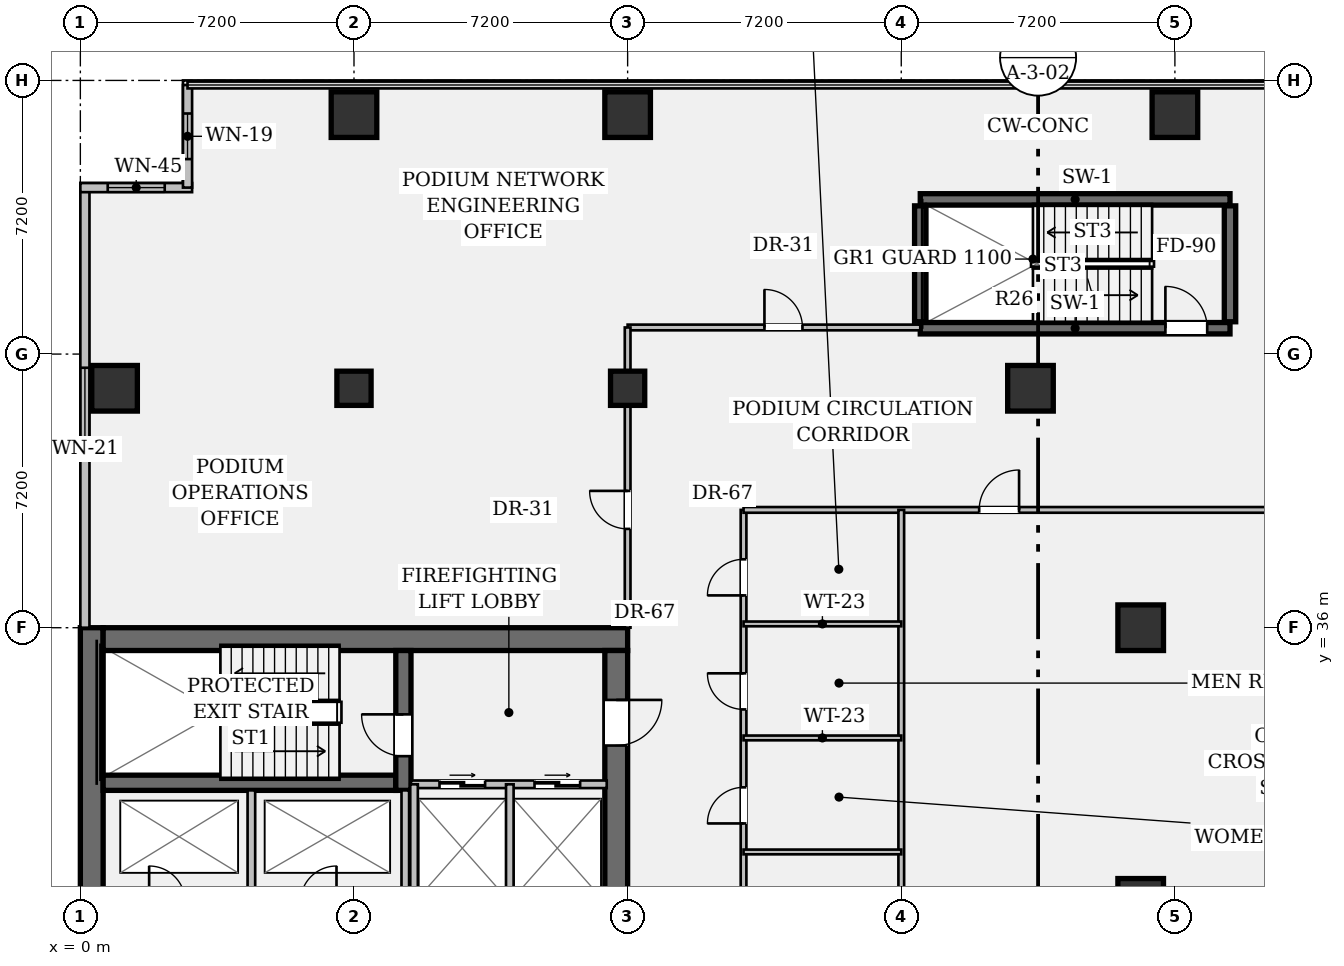
"""IFC4 building model, lengths in metres.
Left out: names, types, materials, properties, quantities, classifications, styles, units other than length and angle.
Written with IfcOpenShell. Run it as: python <this file> out.ifc"""

import sys

from ifc_helpers import new_model, si_unit, direction, frame, frame_2d, origin, origin_2d, place, context, subcontext, project, spatial, rectangle, hollow_rectangle, extrude, element, fill, save


model = new_model("IFC4")
c1 = context("Model", 3, precision=1e-05, world=origin(), true_north=direction((0.0, 1.0)))
c2 = subcontext(c1, "Body", "Model", "MODEL_VIEW")
j1 = project(units=[si_unit("LENGTHUNIT", "METRE"), si_unit("PLANEANGLEUNIT", "RADIAN")], contexts=[c1])
p1 = place(None, origin())
s1 = spatial("IfcSite", under=j1, at=p1, CompositionType="ELEMENT")
p2 = place(p1, origin())
s2 = spatial("IfcBuilding", under=s1, at=p2, CompositionType="ELEMENT")
p3 = place(p2, frame((0.0, 0.0, 9.45)))
s3 = spatial("IfcBuildingStorey", under=s2, at=p3, CompositionType="ELEMENT", Elevation=9.45)
p4 = place(p3, frame((0.3, 7.2, 0.0), z_axis=(0.0, 0.0, 1.0), x_axis=(0.0, 1.0, 0.0)))
e1 = element("IfcWall", 1, at=p4, inside=s3, PredefinedType="SHEAR", context=c2, shape_type="SweptSolid", body=[
    extrude(rectangle(XDim=28.8, YDim=0.6, at=frame_2d((14.4, 0.0))), origin(), (0.0, 0.0, 1.0), 3.9),
])
p5 = place(p3, frame((0.6, 35.7, 0.0), z_axis=(0.0, 0.0, 1.0), x_axis=(1.0, 0.0, 0.0)))
e2 = element("IfcWall", 2, at=p5, inside=s3, PredefinedType="SHEAR", context=c2, shape_type="SweptSolid", body=[
    extrude(rectangle(XDim=13.8, YDim=0.6, at=frame_2d((6.9, 0.0))), origin(), (0.0, 0.0, 1.0), 3.9),
])
p6 = place(p3, frame((14.1, 35.4, 0.0), z_axis=(0.0, 0.0, 1.0), x_axis=(0.0, -1.0, 0.0)))
e3 = element("IfcWall", 3, at=p6, inside=s3, PredefinedType="SHEAR", context=c2, shape_type="SweptSolid", body=[
    extrude(rectangle(XDim=27.6, YDim=0.6, at=frame_2d((13.8, 0.0))), origin(), (0.0, 0.0, 1.0), 3.9),
])
p7 = place(p6, frame((1.3, 0.0, 0.0)))
e4 = element("IfcOpeningElement", 4, at=p7, cuts=e3, PredefinedType="OPENING", context=c2, shape_type="SweptSolid", body=[
    extrude(rectangle(XDim=1.2, YDim=2.15, at=frame_2d((0.6, 1.075))), frame((0.0, 0.312, 0.0), z_axis=(0.0, -1.0, 0.0), x_axis=(1.0, 0.0, 0.0)), (0.0, 0.0, 1.0), 0.624),
])
p8 = place(p6, frame((25.25, 0.0, 0.0)))
e5 = element("IfcOpeningElement", 5, at=p8, cuts=e3, PredefinedType="OPENING", context=c2, shape_type="SweptSolid", body=[
    extrude(rectangle(XDim=1.2, YDim=2.15, at=frame_2d((0.6, 1.075))), frame((0.0, 0.312, 0.0), z_axis=(0.0, -1.0, 0.0), x_axis=(1.0, 0.0, 0.0)), (0.0, 0.0, 1.0), 0.624),
])
p9 = place(p6, frame((14.6, 0.0, 0.0)))
e6 = element("IfcOpeningElement", 6, at=p9, cuts=e3, PredefinedType="OPENING", context=c2, shape_type="SweptSolid", body=[
    extrude(rectangle(XDim=1.6, YDim=2.2, at=frame_2d((0.8, 1.1))), frame((0.0, 0.312, 0.0), z_axis=(0.0, -1.0, 0.0), x_axis=(1.0, 0.0, 0.0)), (0.0, 0.0, 1.0), 0.624),
])
p10 = place(p3, frame((0.6, 31.92, 0.0), z_axis=(0.0, 0.0, 1.0), x_axis=(1.0, 0.0, 0.0)))
e7 = element("IfcWall", 7, at=p10, inside=s3, PredefinedType="SHEAR", context=c2, shape_type="SweptSolid", body=[
    extrude(rectangle(XDim=7.7, YDim=0.4, at=frame_2d((3.85, 0.0))), origin(), (0.0, 0.0, 1.0), 3.9),
])
p11 = place(p3, frame((8.5, 31.72, 0.0), z_axis=(0.0, 0.0, 1.0), x_axis=(0.0, 1.0, 0.0)))
e8 = element("IfcWall", 8, at=p11, inside=s3, PredefinedType="SHEAR", context=c2, shape_type="SweptSolid", body=[
    extrude(rectangle(XDim=3.68, YDim=0.4, at=frame_2d((1.84, 0.0))), origin(), (0.0, 0.0, 1.0), 3.9),
])
p12 = place(p11, frame((0.9, 0.0, 0.0)))
e9 = element("IfcOpeningElement", 9, at=p12, cuts=e8, PredefinedType="OPENING", context=c2, shape_type="SweptSolid", body=[
    extrude(rectangle(XDim=1.1, YDim=2.15, at=frame_2d((0.55, 1.075))), frame((0.0, 0.212, 0.0), z_axis=(0.0, -1.0, 0.0), x_axis=(1.0, 0.0, 0.0)), (0.0, 0.0, 1.0), 0.424),
])
p13 = place(p3, frame((22.1, 43.88, 0.0), z_axis=(0.0, 0.0, 1.0), x_axis=(1.0, 0.0, 0.0)))
e10 = element("IfcWall", 10, at=p13, inside=s3, PredefinedType="SHEAR", context=c2, shape_type="SweptSolid", body=[
    extrude(rectangle(XDim=8.15, YDim=0.3, at=frame_2d((4.075, 0.0))), origin(), (0.0, 0.0, 1.0), 3.9),
])
p14 = place(p13, frame((6.45, 0.0, 0.0)))
e11 = element("IfcOpeningElement", 11, at=p14, cuts=e10, PredefinedType="OPENING", context=c2, shape_type="SweptSolid", body=[
    extrude(rectangle(XDim=1.1, YDim=2.15, at=frame_2d((0.55, 1.075))), frame((0.0, 0.162, 0.0), z_axis=(0.0, -1.0, 0.0), x_axis=(1.0, 0.0, 0.0)), (0.0, 0.0, 1.0), 0.324),
])
p15 = place(p3, frame((22.1, 47.27, 0.0), z_axis=(0.0, 0.0, 1.0), x_axis=(1.0, 0.0, 0.0)))
e12 = element("IfcWall", 12, at=p15, inside=s3, PredefinedType="SHEAR", context=c2, shape_type="SweptSolid", body=[
    extrude(rectangle(XDim=8.15, YDim=0.3, at=frame_2d((4.075, 0.0))), origin(), (0.0, 0.0, 1.0), 3.9),
])
for number, where, z_axis, x_axis in (
    (13, (22.1, 44.05, 0.0), (0.0, 0.0, 1.0), (0.0, 1.0, 0.0)),
    (14, (30.25, 44.05, 0.0), (0.0, 0.0, 1.0), (0.0, 1.0, 0.0)),
):
    element("IfcWall", number, at=place(p3, frame(where, z_axis=z_axis, x_axis=x_axis)), inside=s3, PredefinedType="SHEAR", context=c2, shape_type="SweptSolid", body=[
        extrude(rectangle(XDim=3.05, YDim=0.3, at=frame_2d((1.525, 0.0))), origin(), (0.0, 0.0, 1.0), 3.9),
    ])
p16 = place(p3, frame((0.9, 42.3, 0.0), z_axis=(0.0, 0.0, 1.0), x_axis=(1.0, 0.0, 0.0)))
e15 = element("IfcColumn", 15, at=p16, inside=s3, PredefinedType="COLUMN", context=c2, shape_type="SweptSolid", body=[
    extrude(hollow_rectangle(XDim=1.2, YDim=1.2, WallThickness=0.075, at=origin_2d()), origin(), (0.0, 0.0, 1.0), 3.9),
])
p17 = place(p3, frame((7.2, 42.3, 0.0), z_axis=(0.0, 0.0, 1.0), x_axis=(1.0, 0.0, 0.0)))
e16 = element("IfcColumn", 16, at=p17, inside=s3, PredefinedType="COLUMN", context=c2, shape_type="SweptSolid", body=[
    extrude(rectangle(XDim=0.9, YDim=0.9, at=origin_2d()), origin(), (0.0, 0.0, 1.0), 3.9),
])
p18 = place(p3, frame((7.2, 49.5, 0.0), z_axis=(0.0, 0.0, 1.0), x_axis=(1.0, 0.0, 0.0)))
e17 = element("IfcColumn", 17, at=p18, inside=s3, PredefinedType="COLUMN", context=c2, shape_type="SweptSolid", body=[
    extrude(hollow_rectangle(XDim=1.2, YDim=1.2, WallThickness=0.075, at=origin_2d()), origin(), (0.0, 0.0, 1.0), 3.9),
])
p19 = place(p3, frame((14.4, 42.3, 0.0), z_axis=(0.0, 0.0, 1.0), x_axis=(1.0, 0.0, 0.0)))
e18 = element("IfcColumn", 18, at=p19, inside=s3, PredefinedType="COLUMN", context=c2, shape_type="SweptSolid", body=[
    extrude(rectangle(XDim=0.9, YDim=0.9, at=origin_2d()), origin(), (0.0, 0.0, 1.0), 3.9),
])
for number, where, z_axis, x_axis in (
    (19, (14.4, 49.5, 0.0), (0.0, 0.0, 1.0), (1.0, 0.0, 0.0)),
    (20, (25.0, 42.3, 0.0), (0.0, 0.0, 1.0), (1.0, 0.0, 0.0)),
    (21, (27.9, 28.8, 0.0), (0.0, 0.0, 1.0), (1.0, 0.0, 0.0)),
    (22, (27.9, 36.0, 0.0), (0.0, 0.0, 1.0), (1.0, 0.0, 0.0)),
    (23, (28.8, 49.5, 0.0), (0.0, 0.0, 1.0), (1.0, 0.0, 0.0)),
):
    element("IfcColumn", number, at=place(p3, frame(where, z_axis=z_axis, x_axis=x_axis)), inside=s3, PredefinedType="COLUMN", context=c2, shape_type="SweptSolid", body=[
        extrude(hollow_rectangle(XDim=1.2, YDim=1.2, WallThickness=0.075, at=origin_2d()), origin(), (0.0, 0.0, 1.0), 3.9),
    ])
p20 = place(p3, frame((0.12, 36.0, 0.0), z_axis=(0.0, 0.0, 1.0), x_axis=(0.0, 1.0, 0.0)))
e24 = element("IfcWall", 24, at=p20, inside=s3, PredefinedType="STANDARD", context=c2, shape_type="SweptSolid", body=[
    extrude(rectangle(XDim=11.58, YDim=0.24, at=frame_2d((5.79, 0.0))), origin(), (0.0, 0.0, 1.0), 3.9),
])
p21 = place(p20, frame((4.74, 0.0, 0.95)))
e25 = element("IfcOpeningElement", 25, at=p21, cuts=e24, PredefinedType="OPENING", context=c2, shape_type="SweptSolid", body=[
    extrude(rectangle(XDim=2.1, YDim=1.8, at=frame_2d((1.05, 0.9))), frame((0.0, 0.132, 0.0), z_axis=(0.0, -1.0, 0.0), x_axis=(1.0, 0.0, 0.0)), (0.0, 0.0, 1.0), 0.264),
])
p22 = place(p3, frame((0.0, 47.58, 0.0), z_axis=(0.0, 0.0, 1.0), x_axis=(1.0, 0.0, 0.0)))
e26 = element("IfcWall", 26, at=p22, inside=s3, PredefinedType="STANDARD", context=c2, shape_type="SweptSolid", body=[
    extrude(rectangle(XDim=2.94, YDim=0.24, at=frame_2d((1.47, 0.0))), origin(), (0.0, 0.0, 1.0), 3.9),
])
p23 = place(p22, frame((0.72, 0.0, 0.95)))
e27 = element("IfcOpeningElement", 27, at=p23, cuts=e26, PredefinedType="OPENING", context=c2, shape_type="SweptSolid", body=[
    extrude(rectangle(XDim=1.5, YDim=1.8, at=frame_2d((0.75, 0.9))), frame((0.0, 0.132, 0.0), z_axis=(0.0, -1.0, 0.0), x_axis=(1.0, 0.0, 0.0)), (0.0, 0.0, 1.0), 0.264),
])
p24 = place(p3, frame((2.82, 47.58, 0.0), z_axis=(0.0, 0.0, 1.0), x_axis=(0.0, 1.0, 0.0)))
e28 = element("IfcWall", 28, at=p24, inside=s3, PredefinedType="STANDARD", context=c2, shape_type="SweptSolid", body=[
    extrude(rectangle(XDim=2.7, YDim=0.24, at=frame_2d((1.35, 0.0))), origin(), (0.0, 0.0, 1.0), 3.9),
])
p25 = place(p24, frame((0.75, 0.0, 0.95)))
e29 = element("IfcOpeningElement", 29, at=p25, cuts=e28, PredefinedType="OPENING", context=c2, shape_type="SweptSolid", body=[
    extrude(rectangle(XDim=1.2, YDim=1.8, at=frame_2d((0.6, 0.9))), frame((0.0, 0.132, 0.0), z_axis=(0.0, -1.0, 0.0), x_axis=(1.0, 0.0, 0.0)), (0.0, 0.0, 1.0), 0.264),
])
p26 = place(p3, frame((8.7, 31.88, 0.0), z_axis=(0.0, 0.0, 1.0), x_axis=(1.0, 0.0, 0.0)))
e30 = element("IfcWall", 30, at=p26, inside=s3, PredefinedType="PARTITIONING", context=c2, shape_type="SweptSolid", body=[
    extrude(rectangle(XDim=5.15, YDim=0.2, at=frame_2d((2.575, 0.0))), origin(), (0.0, 0.0, 1.0), 3.9),
])
p27 = place(p26, frame((0.75, 0.0, 0.0)))
e31 = element("IfcOpeningElement", 31, at=p27, cuts=e30, PredefinedType="OPENING", context=c2, shape_type="SweptSolid", body=[
    extrude(rectangle(XDim=1.2, YDim=2.2, at=frame_2d((0.6, 1.1))), frame((0.0, 0.112, 0.0), z_axis=(0.0, -1.0, 0.0), x_axis=(1.0, 0.0, 0.0)), (0.0, 0.0, 1.0), 0.224),
])
p28 = place(p26, frame((3.25, 0.0, 0.0)))
e32 = element("IfcOpeningElement", 32, at=p28, cuts=e30, PredefinedType="OPENING", context=c2, shape_type="SweptSolid", body=[
    extrude(rectangle(XDim=1.2, YDim=2.2, at=frame_2d((0.6, 1.1))), frame((0.0, 0.112, 0.0), z_axis=(0.0, -1.0, 0.0), x_axis=(1.0, 0.0, 0.0)), (0.0, 0.0, 1.0), 0.224),
])
for number, where, z_axis, x_axis in (
    (33, (8.78, 28.78, 0.0), (0.0, 0.0, 1.0), (0.0, 1.0, 0.0)),
    (34, (11.3, 28.78, 0.0), (0.0, 0.0, 1.0), (0.0, 1.0, 0.0)),
):
    element("IfcWall", number, at=place(p3, frame(where, z_axis=z_axis, x_axis=x_axis)), inside=s3, PredefinedType="PARTITIONING", context=c2, shape_type="SweptSolid", body=[
        extrude(rectangle(XDim=3.1, YDim=0.2, at=frame_2d((1.55, 0.0))), origin(), (0.0, 0.0, 1.0), 3.9),
    ])
for number, where, z_axis, x_axis in (
    (35, (4.5, 28.78, 0.0), (0.0, 0.0, 1.0), (0.0, 1.0, 0.0)),
    (36, (8.55, 28.78, 0.0), (0.0, 0.0, 1.0), (0.0, 1.0, 0.0)),
):
    element("IfcWall", number, at=place(p3, frame(where, z_axis=z_axis, x_axis=x_axis)), inside=s3, PredefinedType="PARTITIONING", context=c2, shape_type="SweptSolid", body=[
        extrude(rectangle(XDim=2.94, YDim=0.2, at=frame_2d((1.47, 0.0))), origin(), (0.0, 0.0, 1.0), 3.9),
    ])
p29 = place(p3, frame((17.45, 17.55, 0.0), z_axis=(0.0, 0.0, 1.0), x_axis=(0.0, 1.0, 0.0)))
e37 = element("IfcWall", 37, at=p29, inside=s3, PredefinedType="PARTITIONING", context=c2, shape_type="SweptSolid", body=[
    extrude(rectangle(XDim=21.55, YDim=0.15, at=frame_2d((10.775, 0.0))), origin(), (0.0, 0.0, 1.0), 2.938),
])
p30 = place(p29, frame((19.3, 0.0, 0.0)))
e38 = element("IfcOpeningElement", 38, at=p30, cuts=e37, PredefinedType="OPENING", context=c2, shape_type="SweptSolid", body=[
    extrude(rectangle(XDim=0.95, YDim=2.15, at=frame_2d((0.475, 1.075))), frame((0.0, 0.087, 0.0), z_axis=(0.0, -1.0, 0.0), x_axis=(1.0, 0.0, 0.0)), (0.0, 0.0, 1.0), 0.174),
])
p31 = place(p29, frame((16.3, 0.0, 0.0)))
e39 = element("IfcOpeningElement", 39, at=p31, cuts=e37, PredefinedType="OPENING", context=c2, shape_type="SweptSolid", body=[
    extrude(rectangle(XDim=0.95, YDim=2.15, at=frame_2d((0.475, 1.075))), frame((0.0, 0.087, 0.0), z_axis=(0.0, -1.0, 0.0), x_axis=(1.0, 0.0, 0.0)), (0.0, 0.0, 1.0), 0.174),
])
p32 = place(p29, frame((13.3, 0.0, 0.0)))
e40 = element("IfcOpeningElement", 40, at=p32, cuts=e37, PredefinedType="OPENING", context=c2, shape_type="SweptSolid", body=[
    extrude(rectangle(XDim=0.95, YDim=2.15, at=frame_2d((0.475, 1.075))), frame((0.0, 0.087, 0.0), z_axis=(0.0, -1.0, 0.0), x_axis=(1.0, 0.0, 0.0)), (0.0, 0.0, 1.0), 0.174),
])
p33 = place(p29, frame((10.1, 0.0, 0.0)))
e41 = element("IfcOpeningElement", 41, at=p33, cuts=e37, PredefinedType="OPENING", context=c2, shape_type="SweptSolid", body=[
    extrude(rectangle(XDim=0.95, YDim=2.15, at=frame_2d((0.475, 1.075))), frame((0.0, 0.087, 0.0), z_axis=(0.0, -1.0, 0.0), x_axis=(1.0, 0.0, 0.0)), (0.0, 0.0, 1.0), 0.174),
])
p34 = place(p3, frame((14.4, 43.9, 0.0), z_axis=(0.0, 0.0, 1.0), x_axis=(1.0, 0.0, 0.0)))
e42 = element("IfcWall", 42, at=p34, inside=s3, PredefinedType="PARTITIONING", context=c2, shape_type="SweptSolid", body=[
    extrude(rectangle(XDim=7.7, YDim=0.15, at=frame_2d((3.85, 0.0))), origin(), (0.0, 0.0, 1.0), 2.938),
])
p35 = place(p34, frame((3.6, 0.0, 0.0)))
e43 = element("IfcOpeningElement", 43, at=p35, cuts=e42, PredefinedType="OPENING", context=c2, shape_type="SweptSolid", body=[
    extrude(rectangle(XDim=1.0, YDim=2.15, at=frame_2d((0.5, 1.075))), frame((0.0, 0.087, 0.0), z_axis=(0.0, -1.0, 0.0), x_axis=(1.0, 0.0, 0.0)), (0.0, 0.0, 1.0), 0.174),
])
p36 = place(p3, frame((17.45, 39.1, 0.0), z_axis=(0.0, 0.0, 1.0), x_axis=(1.0, 0.0, 0.0)))
e44 = element("IfcWall", 44, at=p36, inside=s3, PredefinedType="PARTITIONING", context=c2, shape_type="SweptSolid", body=[
    extrude(rectangle(XDim=32.83, YDim=0.15, at=frame_2d((16.415, 0.0))), origin(), (0.0, 0.0, 1.0), 2.938),
])
p37 = place(p36, frame((6.2, 0.0, 0.0)))
e45 = element("IfcOpeningElement", 45, at=p37, cuts=e44, PredefinedType="OPENING", context=c2, shape_type="SweptSolid", body=[
    extrude(rectangle(XDim=1.05, YDim=2.15, at=frame_2d((0.525, 1.075))), frame((0.0, 0.087, 0.0), z_axis=(0.0, -1.0, 0.0), x_axis=(1.0, 0.0, 0.0)), (0.0, 0.0, 1.0), 0.174),
])
p38 = place(p3, frame((21.6, 26.8, 0.0), z_axis=(0.0, 0.0, 1.0), x_axis=(0.0, 1.0, 0.0)))
e46 = element("IfcWall", 46, at=p38, inside=s3, PredefinedType="PARTITIONING", context=c2, shape_type="SweptSolid", body=[
    extrude(rectangle(XDim=12.3, YDim=0.15, at=frame_2d((6.15, 0.0))), origin(), (0.0, 0.0, 1.0), 2.938),
])
p39 = place(p3, frame((17.45, 36.1, 0.0), z_axis=(0.0, 0.0, 1.0), x_axis=(1.0, 0.0, 0.0)))
e47 = element("IfcWall", 47, at=p39, inside=s3, PredefinedType="PARTITIONING", context=c2, shape_type="SweptSolid", body=[
    extrude(rectangle(XDim=4.15, YDim=0.125, at=frame_2d((2.075, 0.0))), origin(), (0.0, 0.0, 1.0), 2.938),
])
for number, where, z_axis, x_axis in (
    (48, (17.45, 33.1, 0.0), (0.0, 0.0, 1.0), (1.0, 0.0, 0.0)),
    (49, (17.45, 30.1, 0.0), (0.0, 0.0, 1.0), (1.0, 0.0, 0.0)),
):
    element("IfcWall", number, at=place(p3, frame(where, z_axis=z_axis, x_axis=x_axis)), inside=s3, PredefinedType="PARTITIONING", context=c2, shape_type="SweptSolid", body=[
        extrude(rectangle(XDim=4.15, YDim=0.125, at=frame_2d((2.075, 0.0))), origin(), (0.0, 0.0, 1.0), 3.336),
    ])
p40 = place(p3, frame((14.4, 36.0, 0.0), z_axis=(0.0, 0.0, 1.0), x_axis=(0.0, 1.0, 0.0)))
e50 = element("IfcWall", 50, at=p40, inside=s3, PredefinedType="PARTITIONING", context=c2, shape_type="SweptSolid", body=[
    extrude(rectangle(XDim=7.9, YDim=0.15, at=frame_2d((3.95, 0.0))), origin(), (0.0, 0.0, 1.0), 2.938),
])
p41 = place(p40, frame((2.6, 0.0, 0.0)))
e51 = element("IfcOpeningElement", 51, at=p41, cuts=e50, PredefinedType="OPENING", context=c2, shape_type="SweptSolid", body=[
    extrude(rectangle(XDim=1.0, YDim=2.15, at=frame_2d((0.5, 1.075))), frame((0.0, 0.087, 0.0), z_axis=(0.0, -1.0, 0.0), x_axis=(1.0, 0.0, 0.0)), (0.0, 0.0, 1.0), 0.174),
])
p42 = place(p21, origin())
e52 = element("IfcWindow", 52, at=p42, inside=s3, PartitioningType="SINGLE_PANEL", PredefinedType="WINDOW", context=c2, shape_type="SweptSolid", body=[
    extrude(rectangle(XDim=2.1, YDim=1.8, at=frame_2d((1.05, 0.9))), frame((0.0, 0.03, 0.0), z_axis=(0.0, -1.0, 0.0), x_axis=(1.0, 0.0, 0.0)), (0.0, 0.0, 1.0), 0.06),
])
fill(e25, e52)
p43 = place(p23, origin())
e53 = element("IfcWindow", 53, at=p43, inside=s3, PartitioningType="SINGLE_PANEL", PredefinedType="WINDOW", context=c2, shape_type="SweptSolid", body=[
    extrude(rectangle(XDim=1.5, YDim=1.8, at=frame_2d((0.75, 0.9))), frame((0.0, 0.03, 0.0), z_axis=(0.0, -1.0, 0.0), x_axis=(1.0, 0.0, 0.0)), (0.0, 0.0, 1.0), 0.06),
])
fill(e27, e53)
p44 = place(p25, origin())
e54 = element("IfcWindow", 54, at=p44, inside=s3, PartitioningType="SINGLE_PANEL", PredefinedType="WINDOW", context=c2, shape_type="SweptSolid", body=[
    extrude(rectangle(XDim=1.2, YDim=1.8, at=frame_2d((0.6, 0.9))), frame((0.0, 0.03, 0.0), z_axis=(0.0, -1.0, 0.0), x_axis=(1.0, 0.0, 0.0)), (0.0, 0.0, 1.0), 0.06),
])
fill(e29, e54)
p45 = place(p12, origin())
e55 = element("IfcDoor", 55, at=p45, inside=s3, OperationType="SINGLE_SWING_RIGHT", PredefinedType="DOOR", context=c2, shape_type="SweptSolid", body=[
    extrude(rectangle(XDim=1.1, YDim=2.15, at=frame_2d((0.55, 1.075))), frame((0.0, 0.025, 0.0), z_axis=(0.0, -1.0, 0.0), x_axis=(1.0, 0.0, 0.0)), (0.0, 0.0, 1.0), 0.05),
])
fill(e9, e55)
p46 = place(p7, origin())
e56 = element("IfcDoor", 56, at=p46, inside=s3, OperationType="SINGLE_SWING_LEFT", PredefinedType="DOOR", context=c2, shape_type="SweptSolid", body=[
    extrude(rectangle(XDim=1.2, YDim=2.15, at=frame_2d((0.6, 1.075))), frame((0.0, 0.025, 0.0), z_axis=(0.0, -1.0, 0.0), x_axis=(1.0, 0.0, 0.0)), (0.0, 0.0, 1.0), 0.05),
])
fill(e4, e56)
p47 = place(p27, origin())
e57 = element("IfcDoor", 57, at=p47, inside=s3, OperationType="DOUBLE_DOOR_SLIDING", PredefinedType="DOOR", context=c2, shape_type="SweptSolid", body=[
    extrude(rectangle(XDim=1.2, YDim=2.2, at=frame_2d((0.6, 1.1))), frame((0.0, 0.025, 0.0), z_axis=(0.0, -1.0, 0.0), x_axis=(1.0, 0.0, 0.0)), (0.0, 0.0, 1.0), 0.05),
])
fill(e31, e57)
p48 = place(p28, origin())
e58 = element("IfcDoor", 58, at=p48, inside=s3, OperationType="DOUBLE_DOOR_SLIDING", PredefinedType="DOOR", context=c2, shape_type="SweptSolid", body=[
    extrude(rectangle(XDim=1.2, YDim=2.2, at=frame_2d((0.6, 1.1))), frame((0.0, 0.025, 0.0), z_axis=(0.0, -1.0, 0.0), x_axis=(1.0, 0.0, 0.0)), (0.0, 0.0, 1.0), 0.05),
])
fill(e32, e58)
p49 = place(p14, origin())
e59 = element("IfcDoor", 59, at=p49, inside=s3, OperationType="SINGLE_SWING_LEFT", PredefinedType="DOOR", context=c2, shape_type="SweptSolid", body=[
    extrude(rectangle(XDim=1.1, YDim=2.15, at=frame_2d((0.55, 1.075))), frame((0.0, 0.025, 0.0), z_axis=(0.0, -1.0, 0.0), x_axis=(1.0, 0.0, 0.0)), (0.0, 0.0, 1.0), 0.05),
])
fill(e11, e59)
p50 = place(p30, origin())
e60 = element("IfcDoor", 60, at=p50, inside=s3, OperationType="SINGLE_SWING_LEFT", PredefinedType="DOOR", context=c2, shape_type="SweptSolid", body=[
    extrude(rectangle(XDim=0.95, YDim=2.15, at=frame_2d((0.475, 1.075))), frame((0.0, 0.025, 0.0), z_axis=(0.0, -1.0, 0.0), x_axis=(1.0, 0.0, 0.0)), (0.0, 0.0, 1.0), 0.05),
])
fill(e38, e60)
p51 = place(p31, origin())
e61 = element("IfcDoor", 61, at=p51, inside=s3, OperationType="SINGLE_SWING_RIGHT", PredefinedType="DOOR", context=c2, shape_type="SweptSolid", body=[
    extrude(rectangle(XDim=0.95, YDim=2.15, at=frame_2d((0.475, 1.075))), frame((0.0, 0.025, 0.0), z_axis=(0.0, -1.0, 0.0), x_axis=(1.0, 0.0, 0.0)), (0.0, 0.0, 1.0), 0.05),
])
fill(e39, e61)
p52 = place(p32, origin())
e62 = element("IfcDoor", 62, at=p52, inside=s3, OperationType="SINGLE_SWING_LEFT", PredefinedType="DOOR", context=c2, shape_type="SweptSolid", body=[
    extrude(rectangle(XDim=0.95, YDim=2.15, at=frame_2d((0.475, 1.075))), frame((0.0, 0.025, 0.0), z_axis=(0.0, -1.0, 0.0), x_axis=(1.0, 0.0, 0.0)), (0.0, 0.0, 1.0), 0.05),
])
fill(e40, e62)
p53 = place(p37, origin())
e63 = element("IfcDoor", 63, at=p53, inside=s3, OperationType="SINGLE_SWING_RIGHT", PredefinedType="DOOR", context=c2, shape_type="SweptSolid", body=[
    extrude(rectangle(XDim=1.05, YDim=2.15, at=frame_2d((0.525, 1.075))), frame((0.0, 0.025, 0.0), z_axis=(0.0, -1.0, 0.0), x_axis=(1.0, 0.0, 0.0)), (0.0, 0.0, 1.0), 0.05),
])
fill(e45, e63)
p54 = place(p35, origin())
e64 = element("IfcDoor", 64, at=p54, inside=s3, OperationType="SINGLE_SWING_LEFT", PredefinedType="DOOR", context=c2, shape_type="SweptSolid", body=[
    extrude(rectangle(XDim=1.0, YDim=2.15, at=frame_2d((0.5, 1.075))), frame((0.0, 0.025, 0.0), z_axis=(0.0, -1.0, 0.0), x_axis=(1.0, 0.0, 0.0)), (0.0, 0.0, 1.0), 0.05),
])
fill(e43, e64)
p55 = place(p41, origin())
e65 = element("IfcDoor", 65, at=p55, inside=s3, OperationType="SINGLE_SWING_RIGHT", PredefinedType="DOOR", context=c2, shape_type="SweptSolid", body=[
    extrude(rectangle(XDim=1.0, YDim=2.15, at=frame_2d((0.5, 1.075))), frame((0.0, 0.025, 0.0), z_axis=(0.0, -1.0, 0.0), x_axis=(1.0, 0.0, 0.0)), (0.0, 0.0, 1.0), 0.05),
])
fill(e51, e65)
save(model, sys.argv[1])
